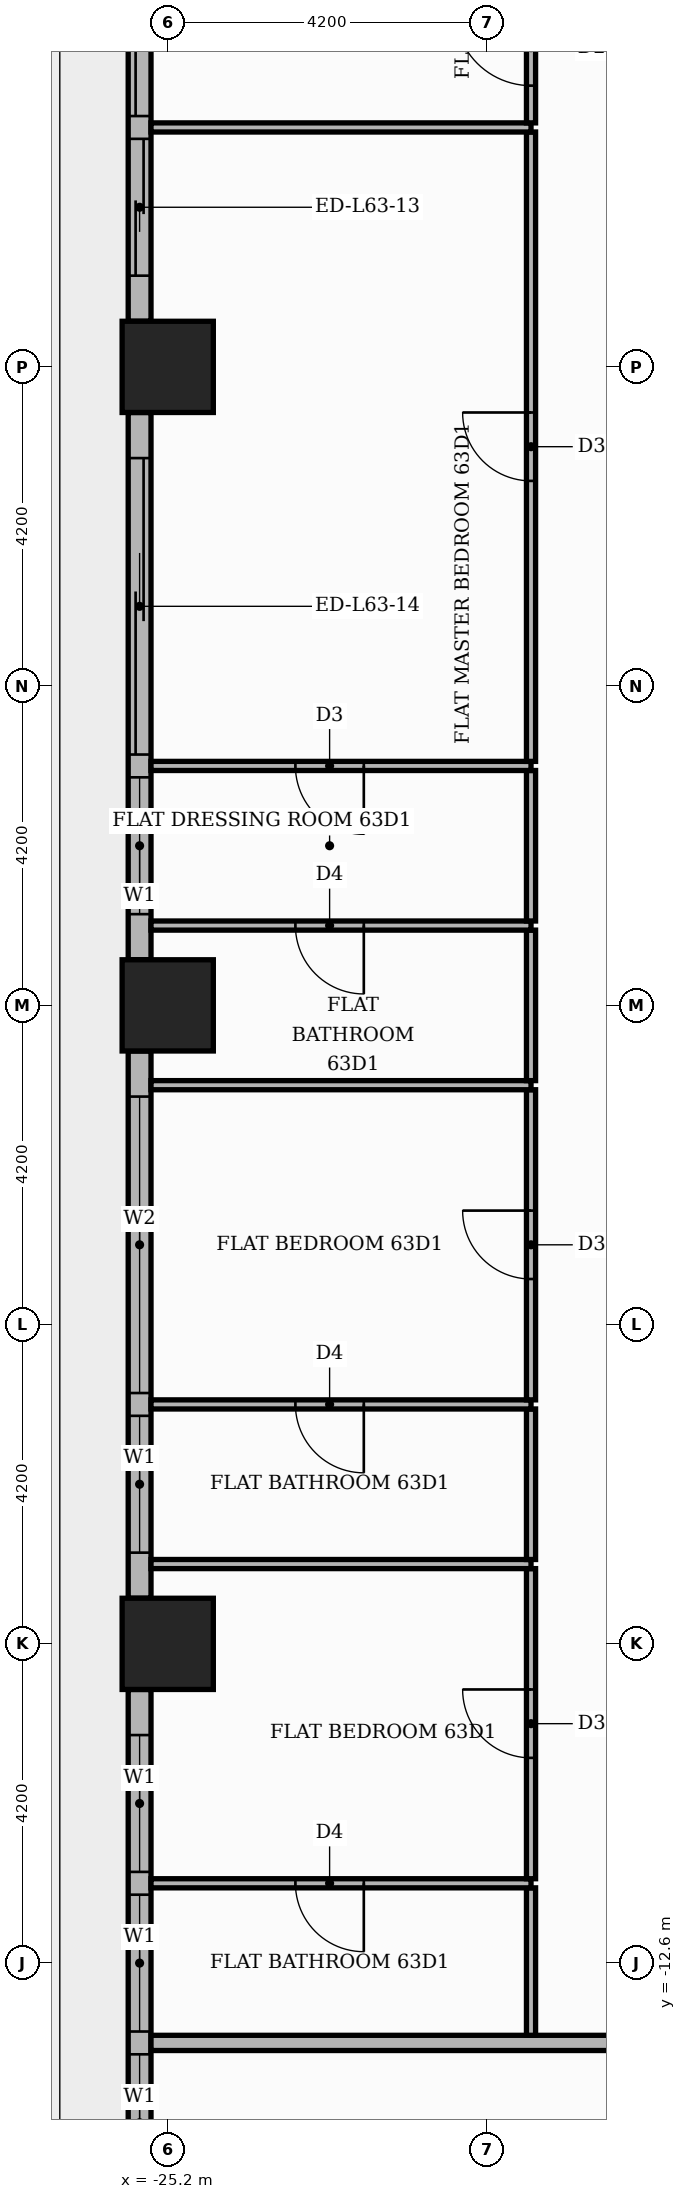
"""IFC4 building model, lengths in metres.
Left out: names, types, materials, properties, quantities, classifications, styles, units other than length and angle.
Written with IfcOpenShell. Run it as: python <this file> out.ifc"""

import sys

from ifc_helpers import new_model, si_unit, direction, frame, frame_2d, origin, origin_2d, place, context, subcontext, project, spatial, rectangle, extrude, element, fill, save


model = new_model("IFC4")
c1 = context("Model", 3, precision=1e-05, world=origin(), true_north=direction((0.0, 1.0)))
c2 = subcontext(c1, "Body", "Model", "MODEL_VIEW")
j1 = project(units=[si_unit("LENGTHUNIT", "METRE"), si_unit("PLANEANGLEUNIT", "RADIAN")], contexts=[c1])
p1 = place(None, origin())
s1 = spatial("IfcSite", under=j1, at=p1, CompositionType="ELEMENT")
p2 = place(p1, origin())
s2 = spatial("IfcBuilding", under=s1, at=p2, CompositionType="ELEMENT")
p3 = place(p2, frame((0.0, 0.0, 264.0)))
s3 = spatial("IfcBuildingStorey", under=s2, at=p3, CompositionType="ELEMENT", Elevation=264.0)
for number, where, z_axis, x_axis in (
    (1, (-25.2, 0.0, 0.0), (0.0, 0.0, 1.0), (1.0, 0.0, 0.0)),
    (2, (-25.2, -8.4, 0.0), (0.0, 0.0, 1.0), (1.0, 0.0, 0.0)),
    (3, (-25.2, 8.4, 0.0), (0.0, 0.0, 1.0), (1.0, 0.0, 0.0)),
):
    element("IfcColumn", number, at=place(p3, frame(where, z_axis=z_axis, x_axis=x_axis)), inside=s3, PredefinedType="COLUMN", context=c2, shape_type="SweptSolid", body=[
        extrude(rectangle(XDim=1.2, YDim=1.2, at=origin_2d()), origin(), (0.0, 0.0, 1.0), 3.9),
    ])
p4 = place(p3, frame((-25.57, 16.2, 0.0), z_axis=(0.0, 0.0, 1.0), x_axis=(0.0, -1.0, 0.0)))
e4 = element("IfcWall", 4, at=p4, inside=s3, PredefinedType="STANDARD", context=c2, shape_type="SweptSolid", body=[
    extrude(rectangle(XDim=7.2, YDim=0.3, at=frame_2d((3.6, 0.0))), origin(), (0.0, 0.0, 1.0), 3.48),
])
p5 = place(p4, frame((0.6, 0.0, 0.0)))
e5 = element("IfcOpeningElement", 5, at=p5, cuts=e4, PredefinedType="OPENING", context=c2, shape_type="SweptSolid", body=[
    extrude(rectangle(XDim=3.9, YDim=2.4, at=frame_2d((1.95, 1.2))), frame((0.0, 0.16, 0.0), z_axis=(0.0, -1.0, 0.0), x_axis=(1.0, 0.0, 0.0)), (0.0, 0.0, 1.0), 0.32),
])
p6 = place(p4, frame((4.8, 0.0, 0.0)))
e6 = element("IfcOpeningElement", 6, at=p6, cuts=e4, PredefinedType="OPENING", context=c2, shape_type="SweptSolid", body=[
    extrude(rectangle(XDim=1.8, YDim=2.4, at=frame_2d((0.9, 1.2))), frame((0.0, 0.16, 0.0), z_axis=(0.0, -1.0, 0.0), x_axis=(1.0, 0.0, 0.0)), (0.0, 0.0, 1.0), 0.32),
])
p7 = place(p3, frame((-25.57, 7.8, 0.0), z_axis=(0.0, 0.0, 1.0), x_axis=(0.0, -1.0, 0.0)))
e7 = element("IfcWall", 7, at=p7, inside=s3, PredefinedType="STANDARD", context=c2, shape_type="SweptSolid", body=[
    extrude(rectangle(XDim=7.2, YDim=0.3, at=frame_2d((3.6, 0.0))), origin(), (0.0, 0.0, 1.0), 3.48),
])
p8 = place(p7, frame((0.6, 0.0, 0.0)))
e8 = element("IfcOpeningElement", 8, at=p8, cuts=e7, PredefinedType="OPENING", context=c2, shape_type="SweptSolid", body=[
    extrude(rectangle(XDim=3.9, YDim=2.4, at=frame_2d((1.95, 1.2))), frame((0.0, 0.16, 0.0), z_axis=(0.0, -1.0, 0.0), x_axis=(1.0, 0.0, 0.0)), (0.0, 0.0, 1.0), 0.32),
])
p9 = place(p7, frame((4.8, 0.0, 0.9)))
e9 = element("IfcOpeningElement", 9, at=p9, cuts=e7, PredefinedType="OPENING", context=c2, shape_type="SweptSolid", body=[
    extrude(rectangle(XDim=1.8, YDim=2.1, at=frame_2d((0.9, 1.05))), frame((0.0, 0.16, 0.0), z_axis=(0.0, -1.0, 0.0), x_axis=(1.0, 0.0, 0.0)), (0.0, 0.0, 1.0), 0.32),
])
p10 = place(p3, frame((-25.57, -0.6, 0.0), z_axis=(0.0, 0.0, 1.0), x_axis=(0.0, -1.0, 0.0)))
e10 = element("IfcWall", 10, at=p10, inside=s3, PredefinedType="STANDARD", context=c2, shape_type="SweptSolid", body=[
    extrude(rectangle(XDim=7.2, YDim=0.3, at=frame_2d((3.6, 0.0))), origin(), (0.0, 0.0, 1.0), 3.48),
])
p11 = place(p10, frame((0.6, 0.0, 0.9)))
e11 = element("IfcOpeningElement", 11, at=p11, cuts=e10, PredefinedType="OPENING", context=c2, shape_type="SweptSolid", body=[
    extrude(rectangle(XDim=3.9, YDim=2.1, at=frame_2d((1.95, 1.05))), frame((0.0, 0.16, 0.0), z_axis=(0.0, -1.0, 0.0), x_axis=(1.0, 0.0, 0.0)), (0.0, 0.0, 1.0), 0.32),
])
p12 = place(p10, frame((4.8, 0.0, 0.9)))
e12 = element("IfcOpeningElement", 12, at=p12, cuts=e10, PredefinedType="OPENING", context=c2, shape_type="SweptSolid", body=[
    extrude(rectangle(XDim=1.8, YDim=2.1, at=frame_2d((0.9, 1.05))), frame((0.0, 0.16, 0.0), z_axis=(0.0, -1.0, 0.0), x_axis=(1.0, 0.0, 0.0)), (0.0, 0.0, 1.0), 0.32),
])
p13 = place(p3, frame((-25.57, -9.0, 0.0), z_axis=(0.0, 0.0, 1.0), x_axis=(0.0, -1.0, 0.0)))
e13 = element("IfcWall", 13, at=p13, inside=s3, PredefinedType="STANDARD", context=c2, shape_type="SweptSolid", body=[
    extrude(rectangle(XDim=7.2, YDim=0.3, at=frame_2d((3.6, 0.0))), origin(), (0.0, 0.0, 1.0), 3.48),
])
p14 = place(p13, frame((0.6, 0.0, 0.9)))
e14 = element("IfcOpeningElement", 14, at=p14, cuts=e13, PredefinedType="OPENING", context=c2, shape_type="SweptSolid", body=[
    extrude(rectangle(XDim=1.8, YDim=2.1, at=frame_2d((0.9, 1.05))), frame((0.0, 0.16, 0.0), z_axis=(0.0, -1.0, 0.0), x_axis=(1.0, 0.0, 0.0)), (0.0, 0.0, 1.0), 0.32),
])
p15 = place(p13, frame((2.7, 0.0, 0.9)))
e15 = element("IfcOpeningElement", 15, at=p15, cuts=e13, PredefinedType="OPENING", context=c2, shape_type="SweptSolid", body=[
    extrude(rectangle(XDim=1.8, YDim=2.1, at=frame_2d((0.9, 1.05))), frame((0.0, 0.16, 0.0), z_axis=(0.0, -1.0, 0.0), x_axis=(1.0, 0.0, 0.0)), (0.0, 0.0, 1.0), 0.32),
])
p16 = place(p13, frame((4.8, 0.0, 0.9)))
e16 = element("IfcOpeningElement", 16, at=p16, cuts=e13, PredefinedType="OPENING", context=c2, shape_type="SweptSolid", body=[
    extrude(rectangle(XDim=1.8, YDim=2.1, at=frame_2d((0.9, 1.05))), frame((0.0, 0.16, 0.0), z_axis=(0.0, -1.0, 0.0), x_axis=(1.0, 0.0, 0.0)), (0.0, 0.0, 1.0), 0.32),
])
p17 = place(p3, frame((-25.42, -13.65, 0.0), z_axis=(0.0, 0.0, 1.0), x_axis=(1.0, 0.0, 0.0)))
e17 = element("IfcWall", 17, at=p17, inside=s3, PredefinedType="PARTITIONING", context=c2, shape_type="SweptSolid", body=[
    extrude(rectangle(XDim=39.07, YDim=0.2, at=frame_2d((19.535, 0.0))), origin(), (0.0, 0.0, 1.0), 3.48),
])
p18 = place(p17, frame((14.37, 0.0, 0.0)))
e18 = element("IfcOpeningElement", 18, at=p18, cuts=e17, PredefinedType="OPENING", context=c2, shape_type="SweptSolid", body=[
    extrude(rectangle(XDim=1.1, YDim=2.4, at=frame_2d((0.55, 1.2))), frame((0.0, 0.11, 0.0), z_axis=(0.0, -1.0, 0.0), x_axis=(1.0, 0.0, 0.0)), (0.0, 0.0, 1.0), 0.22),
])
p19 = place(p3, frame((-20.42, -13.55, 0.0), z_axis=(0.0, 0.0, 1.0), x_axis=(0.0, 1.0, 0.0)))
e19 = element("IfcWall", 19, at=p19, inside=s3, PredefinedType="PARTITIONING", context=c2, shape_type="SweptSolid", body=[
    extrude(rectangle(XDim=1.94, YDim=0.12, at=frame_2d((0.97, 0.0))), origin(), (0.0, 0.0, 1.0), 3.48),
])
p20 = place(p3, frame((-25.42, -11.55, 0.0), z_axis=(0.0, 0.0, 1.0), x_axis=(1.0, 0.0, 0.0)))
e20 = element("IfcWall", 20, at=p20, inside=s3, PredefinedType="PARTITIONING", context=c2, shape_type="SweptSolid", body=[
    extrude(rectangle(XDim=5.0, YDim=0.12, at=frame_2d((2.5, 0.0))), origin(), (0.0, 0.0, 1.0), 3.48),
])
p21 = place(p20, frame((1.9, 0.0, 0.0)))
e21 = element("IfcOpeningElement", 21, at=p21, cuts=e20, PredefinedType="OPENING", context=c2, shape_type="SweptSolid", body=[
    extrude(rectangle(XDim=0.9, YDim=2.1, at=frame_2d((0.45, 1.05))), frame((0.0, 0.07, 0.0), z_axis=(0.0, -1.0, 0.0), x_axis=(1.0, 0.0, 0.0)), (0.0, 0.0, 1.0), 0.14),
])
p22 = place(p3, frame((-20.42, -11.49, 0.0), z_axis=(0.0, 0.0, 1.0), x_axis=(0.0, 1.0, 0.0)))
e22 = element("IfcWall", 22, at=p22, inside=s3, PredefinedType="PARTITIONING", context=c2, shape_type="SweptSolid", body=[
    extrude(rectangle(XDim=4.08, YDim=0.12, at=frame_2d((2.04, 0.0))), origin(), (0.0, 0.0, 1.0), 3.48),
])
p23 = place(p22, frame((1.59, 0.0, 0.0)))
e23 = element("IfcOpeningElement", 23, at=p23, cuts=e22, PredefinedType="OPENING", context=c2, shape_type="SweptSolid", body=[
    extrude(rectangle(XDim=0.9, YDim=2.1, at=frame_2d((0.45, 1.05))), frame((0.0, 0.07, 0.0), z_axis=(0.0, -1.0, 0.0), x_axis=(1.0, 0.0, 0.0)), (0.0, 0.0, 1.0), 0.14),
])
p24 = place(p3, frame((-25.42, -7.35, 0.0), z_axis=(0.0, 0.0, 1.0), x_axis=(1.0, 0.0, 0.0)))
e24 = element("IfcWall", 24, at=p24, inside=s3, PredefinedType="PARTITIONING", context=c2, shape_type="SweptSolid", body=[
    extrude(rectangle(XDim=5.0, YDim=0.12, at=frame_2d((2.5, 0.0))), origin(), (0.0, 0.0, 1.0), 3.48),
])
p25 = place(p3, frame((-20.42, -7.29, 0.0), z_axis=(0.0, 0.0, 1.0), x_axis=(0.0, 1.0, 0.0)))
e25 = element("IfcWall", 25, at=p25, inside=s3, PredefinedType="PARTITIONING", context=c2, shape_type="SweptSolid", body=[
    extrude(rectangle(XDim=1.98, YDim=0.12, at=frame_2d((0.99, 0.0))), origin(), (0.0, 0.0, 1.0), 3.48),
])
p26 = place(p3, frame((-25.42, -5.25, 0.0), z_axis=(0.0, 0.0, 1.0), x_axis=(1.0, 0.0, 0.0)))
e26 = element("IfcWall", 26, at=p26, inside=s3, PredefinedType="PARTITIONING", context=c2, shape_type="SweptSolid", body=[
    extrude(rectangle(XDim=5.0, YDim=0.12, at=frame_2d((2.5, 0.0))), origin(), (0.0, 0.0, 1.0), 3.48),
])
p27 = place(p26, frame((1.9, 0.0, 0.0)))
e27 = element("IfcOpeningElement", 27, at=p27, cuts=e26, PredefinedType="OPENING", context=c2, shape_type="SweptSolid", body=[
    extrude(rectangle(XDim=0.9, YDim=2.1, at=frame_2d((0.45, 1.05))), frame((0.0, 0.07, 0.0), z_axis=(0.0, -1.0, 0.0), x_axis=(1.0, 0.0, 0.0)), (0.0, 0.0, 1.0), 0.14),
])
p28 = place(p3, frame((-20.42, -5.19, 0.0), z_axis=(0.0, 0.0, 1.0), x_axis=(0.0, 1.0, 0.0)))
e28 = element("IfcWall", 28, at=p28, inside=s3, PredefinedType="PARTITIONING", context=c2, shape_type="SweptSolid", body=[
    extrude(rectangle(XDim=4.08, YDim=0.12, at=frame_2d((2.04, 0.0))), origin(), (0.0, 0.0, 1.0), 3.48),
])
p29 = place(p28, frame((1.59, 0.0, 0.0)))
e29 = element("IfcOpeningElement", 29, at=p29, cuts=e28, PredefinedType="OPENING", context=c2, shape_type="SweptSolid", body=[
    extrude(rectangle(XDim=0.9, YDim=2.1, at=frame_2d((0.45, 1.05))), frame((0.0, 0.07, 0.0), z_axis=(0.0, -1.0, 0.0), x_axis=(1.0, 0.0, 0.0)), (0.0, 0.0, 1.0), 0.14),
])
p30 = place(p3, frame((-25.42, -1.05, 0.0), z_axis=(0.0, 0.0, 1.0), x_axis=(1.0, 0.0, 0.0)))
e30 = element("IfcWall", 30, at=p30, inside=s3, PredefinedType="PARTITIONING", context=c2, shape_type="SweptSolid", body=[
    extrude(rectangle(XDim=5.0, YDim=0.12, at=frame_2d((2.5, 0.0))), origin(), (0.0, 0.0, 1.0), 3.48),
])
p31 = place(p3, frame((-20.42, -0.99, 0.0), z_axis=(0.0, 0.0, 1.0), x_axis=(0.0, 1.0, 0.0)))
e31 = element("IfcWall", 31, at=p31, inside=s3, PredefinedType="PARTITIONING", context=c2, shape_type="SweptSolid", body=[
    extrude(rectangle(XDim=1.98, YDim=0.12, at=frame_2d((0.99, 0.0))), origin(), (0.0, 0.0, 1.0), 3.48),
])
p32 = place(p3, frame((-25.42, 1.05, 0.0), z_axis=(0.0, 0.0, 1.0), x_axis=(1.0, 0.0, 0.0)))
e32 = element("IfcWall", 32, at=p32, inside=s3, PredefinedType="PARTITIONING", context=c2, shape_type="SweptSolid", body=[
    extrude(rectangle(XDim=5.0, YDim=0.12, at=frame_2d((2.5, 0.0))), origin(), (0.0, 0.0, 1.0), 3.48),
])
p33 = place(p32, frame((1.9, 0.0, 0.0)))
e33 = element("IfcOpeningElement", 33, at=p33, cuts=e32, PredefinedType="OPENING", context=c2, shape_type="SweptSolid", body=[
    extrude(rectangle(XDim=0.9, YDim=2.1, at=frame_2d((0.45, 1.05))), frame((0.0, 0.07, 0.0), z_axis=(0.0, -1.0, 0.0), x_axis=(1.0, 0.0, 0.0)), (0.0, 0.0, 1.0), 0.14),
])
p34 = place(p3, frame((-20.42, 1.11, 0.0), z_axis=(0.0, 0.0, 1.0), x_axis=(0.0, 1.0, 0.0)))
e34 = element("IfcWall", 34, at=p34, inside=s3, PredefinedType="PARTITIONING", context=c2, shape_type="SweptSolid", body=[
    extrude(rectangle(XDim=1.98, YDim=0.12, at=frame_2d((0.99, 0.0))), origin(), (0.0, 0.0, 1.0), 3.48),
])
p35 = place(p3, frame((-25.42, 3.15, 0.0), z_axis=(0.0, 0.0, 1.0), x_axis=(1.0, 0.0, 0.0)))
e35 = element("IfcWall", 35, at=p35, inside=s3, PredefinedType="PARTITIONING", context=c2, shape_type="SweptSolid", body=[
    extrude(rectangle(XDim=5.0, YDim=0.12, at=frame_2d((2.5, 0.0))), origin(), (0.0, 0.0, 1.0), 3.48),
])
p36 = place(p35, frame((1.9, 0.0, 0.0)))
e36 = element("IfcOpeningElement", 36, at=p36, cuts=e35, PredefinedType="OPENING", context=c2, shape_type="SweptSolid", body=[
    extrude(rectangle(XDim=0.9, YDim=2.1, at=frame_2d((0.45, 1.05))), frame((0.0, 0.07, 0.0), z_axis=(0.0, -1.0, 0.0), x_axis=(1.0, 0.0, 0.0)), (0.0, 0.0, 1.0), 0.14),
])
p37 = place(p3, frame((-20.42, 3.21, 0.0), z_axis=(0.0, 0.0, 1.0), x_axis=(0.0, 1.0, 0.0)))
e37 = element("IfcWall", 37, at=p37, inside=s3, PredefinedType="PARTITIONING", context=c2, shape_type="SweptSolid", body=[
    extrude(rectangle(XDim=8.28, YDim=0.12, at=frame_2d((4.14, 0.0))), origin(), (0.0, 0.0, 1.0), 3.48),
])
p38 = place(p37, frame((3.69, 0.0, 0.0)))
e38 = element("IfcOpeningElement", 38, at=p38, cuts=e37, PredefinedType="OPENING", context=c2, shape_type="SweptSolid", body=[
    extrude(rectangle(XDim=0.9, YDim=2.1, at=frame_2d((0.45, 1.05))), frame((0.0, 0.07, 0.0), z_axis=(0.0, -1.0, 0.0), x_axis=(1.0, 0.0, 0.0)), (0.0, 0.0, 1.0), 0.14),
])
p39 = place(p3, frame((-25.42, 11.55, 0.0), z_axis=(0.0, 0.0, 1.0), x_axis=(1.0, 0.0, 0.0)))
e39 = element("IfcWall", 39, at=p39, inside=s3, PredefinedType="PARTITIONING", context=c2, shape_type="SweptSolid", body=[
    extrude(rectangle(XDim=5.0, YDim=0.12, at=frame_2d((2.5, 0.0))), origin(), (0.0, 0.0, 1.0), 3.48),
])
p40 = place(p3, frame((-20.42, 11.61, 0.0), z_axis=(0.0, 0.0, 1.0), x_axis=(0.0, 1.0, 0.0)))
e40 = element("IfcWall", 40, at=p40, inside=s3, PredefinedType="PARTITIONING", context=c2, shape_type="SweptSolid", body=[
    extrude(rectangle(XDim=1.98, YDim=0.12, at=frame_2d((0.99, 0.0))), origin(), (0.0, 0.0, 1.0), 3.48),
])
p41 = place(p40, frame((0.49, 0.0, 0.0)))
e41 = element("IfcOpeningElement", 41, at=p41, cuts=e40, PredefinedType="OPENING", context=c2, shape_type="SweptSolid", body=[
    extrude(rectangle(XDim=1.0, YDim=2.1, at=frame_2d((0.5, 1.05))), frame((0.0, 0.07, 0.0), z_axis=(0.0, -1.0, 0.0), x_axis=(1.0, 0.0, 0.0)), (0.0, 0.0, 1.0), 0.14),
])
p42 = place(p5, origin())
e42 = element("IfcDoor", 42, at=p42, inside=s3, OperationType="SLIDING_TO_LEFT", PredefinedType="DOOR", context=c2, shape_type="SweptSolid", body=[
    extrude(rectangle(XDim=3.9, YDim=2.4, at=frame_2d((1.95, 1.2))), frame((0.0, 0.025, 0.0), z_axis=(0.0, -1.0, 0.0), x_axis=(1.0, 0.0, 0.0)), (0.0, 0.0, 1.0), 0.05),
])
fill(e5, e42)
p43 = place(p6, origin())
e43 = element("IfcDoor", 43, at=p43, inside=s3, OperationType="SLIDING_TO_RIGHT", PredefinedType="DOOR", context=c2, shape_type="SweptSolid", body=[
    extrude(rectangle(XDim=1.8, YDim=2.4, at=frame_2d((0.9, 1.2))), frame((0.0, 0.025, 0.0), z_axis=(0.0, -1.0, 0.0), x_axis=(1.0, 0.0, 0.0)), (0.0, 0.0, 1.0), 0.05),
])
fill(e6, e43)
p44 = place(p8, origin())
e44 = element("IfcDoor", 44, at=p44, inside=s3, OperationType="SLIDING_TO_LEFT", PredefinedType="DOOR", context=c2, shape_type="SweptSolid", body=[
    extrude(rectangle(XDim=3.9, YDim=2.4, at=frame_2d((1.95, 1.2))), frame((0.0, 0.025, 0.0), z_axis=(0.0, -1.0, 0.0), x_axis=(1.0, 0.0, 0.0)), (0.0, 0.0, 1.0), 0.05),
])
fill(e8, e44)
p45 = place(p9, origin())
e45 = element("IfcWindow", 45, at=p45, inside=s3, PartitioningType="SINGLE_PANEL", PredefinedType="WINDOW", context=c2, shape_type="SweptSolid", body=[
    extrude(rectangle(XDim=1.8, YDim=2.1, at=frame_2d((0.9, 1.05))), frame((0.0, 0.03, 0.0), z_axis=(0.0, -1.0, 0.0), x_axis=(1.0, 0.0, 0.0)), (0.0, 0.0, 1.0), 0.06),
])
fill(e9, e45)
p46 = place(p11, origin())
e46 = element("IfcWindow", 46, at=p46, inside=s3, PartitioningType="SINGLE_PANEL", PredefinedType="WINDOW", context=c2, shape_type="SweptSolid", body=[
    extrude(rectangle(XDim=3.9, YDim=2.1, at=frame_2d((1.95, 1.05))), frame((0.0, 0.03, 0.0), z_axis=(0.0, -1.0, 0.0), x_axis=(1.0, 0.0, 0.0)), (0.0, 0.0, 1.0), 0.06),
])
fill(e11, e46)
p47 = place(p12, origin())
e47 = element("IfcWindow", 47, at=p47, inside=s3, PartitioningType="SINGLE_PANEL", PredefinedType="WINDOW", context=c2, shape_type="SweptSolid", body=[
    extrude(rectangle(XDim=1.8, YDim=2.1, at=frame_2d((0.9, 1.05))), frame((0.0, 0.03, 0.0), z_axis=(0.0, -1.0, 0.0), x_axis=(1.0, 0.0, 0.0)), (0.0, 0.0, 1.0), 0.06),
])
fill(e12, e47)
p48 = place(p14, origin())
e48 = element("IfcWindow", 48, at=p48, inside=s3, PartitioningType="SINGLE_PANEL", PredefinedType="WINDOW", context=c2, shape_type="SweptSolid", body=[
    extrude(rectangle(XDim=1.8, YDim=2.1, at=frame_2d((0.9, 1.05))), frame((0.0, 0.03, 0.0), z_axis=(0.0, -1.0, 0.0), x_axis=(1.0, 0.0, 0.0)), (0.0, 0.0, 1.0), 0.06),
])
fill(e14, e48)
p49 = place(p15, origin())
e49 = element("IfcWindow", 49, at=p49, inside=s3, PartitioningType="SINGLE_PANEL", PredefinedType="WINDOW", context=c2, shape_type="SweptSolid", body=[
    extrude(rectangle(XDim=1.8, YDim=2.1, at=frame_2d((0.9, 1.05))), frame((0.0, 0.03, 0.0), z_axis=(0.0, -1.0, 0.0), x_axis=(1.0, 0.0, 0.0)), (0.0, 0.0, 1.0), 0.06),
])
fill(e15, e49)
p50 = place(p16, origin())
e50 = element("IfcWindow", 50, at=p50, inside=s3, PartitioningType="SINGLE_PANEL", PredefinedType="WINDOW", context=c2, shape_type="SweptSolid", body=[
    extrude(rectangle(XDim=1.8, YDim=2.1, at=frame_2d((0.9, 1.05))), frame((0.0, 0.03, 0.0), z_axis=(0.0, -1.0, 0.0), x_axis=(1.0, 0.0, 0.0)), (0.0, 0.0, 1.0), 0.06),
])
fill(e16, e50)
p51 = place(p41, origin())
e51 = element("IfcDoor", 51, at=p51, inside=s3, OperationType="SINGLE_SWING_RIGHT", PredefinedType="DOOR", context=c2, shape_type="SweptSolid", body=[
    extrude(rectangle(XDim=1.0, YDim=2.1, at=frame_2d((0.5, 1.05))), frame((0.0, 0.025, 0.0), z_axis=(0.0, -1.0, 0.0), x_axis=(1.0, 0.0, 0.0)), (0.0, 0.0, 1.0), 0.05),
])
fill(e41, e51)
p52 = place(p38, origin())
e52 = element("IfcDoor", 52, at=p52, inside=s3, OperationType="SINGLE_SWING_RIGHT", PredefinedType="DOOR", context=c2, shape_type="SweptSolid", body=[
    extrude(rectangle(XDim=0.9, YDim=2.1, at=frame_2d((0.45, 1.05))), frame((0.0, 0.025, 0.0), z_axis=(0.0, -1.0, 0.0), x_axis=(1.0, 0.0, 0.0)), (0.0, 0.0, 1.0), 0.05),
])
fill(e38, e52)
p53 = place(p36, frame((0.9, 0.0, 0.0), z_axis=(0.0, 0.0, 1.0), x_axis=(-1.0, 0.0, 0.0)))
e53 = element("IfcDoor", 53, at=p53, inside=s3, OperationType="SINGLE_SWING_RIGHT", PredefinedType="DOOR", context=c2, shape_type="SweptSolid", body=[
    extrude(rectangle(XDim=0.9, YDim=2.1, at=frame_2d((0.45, 1.05))), frame((0.0, 0.025, 0.0), z_axis=(0.0, -1.0, 0.0), x_axis=(1.0, 0.0, 0.0)), (0.0, 0.0, 1.0), 0.05),
])
fill(e36, e53)
p54 = place(p33, frame((0.9, 0.0, 0.0), z_axis=(0.0, 0.0, 1.0), x_axis=(-1.0, 0.0, 0.0)))
e54 = element("IfcDoor", 54, at=p54, inside=s3, OperationType="SINGLE_SWING_RIGHT", PredefinedType="DOOR", context=c2, shape_type="SweptSolid", body=[
    extrude(rectangle(XDim=0.9, YDim=2.1, at=frame_2d((0.45, 1.05))), frame((0.0, 0.025, 0.0), z_axis=(0.0, -1.0, 0.0), x_axis=(1.0, 0.0, 0.0)), (0.0, 0.0, 1.0), 0.05),
])
fill(e33, e54)
p55 = place(p29, origin())
e55 = element("IfcDoor", 55, at=p55, inside=s3, OperationType="SINGLE_SWING_RIGHT", PredefinedType="DOOR", context=c2, shape_type="SweptSolid", body=[
    extrude(rectangle(XDim=0.9, YDim=2.1, at=frame_2d((0.45, 1.05))), frame((0.0, 0.025, 0.0), z_axis=(0.0, -1.0, 0.0), x_axis=(1.0, 0.0, 0.0)), (0.0, 0.0, 1.0), 0.05),
])
fill(e29, e55)
p56 = place(p27, frame((0.9, 0.0, 0.0), z_axis=(0.0, 0.0, 1.0), x_axis=(-1.0, 0.0, 0.0)))
e56 = element("IfcDoor", 56, at=p56, inside=s3, OperationType="SINGLE_SWING_RIGHT", PredefinedType="DOOR", context=c2, shape_type="SweptSolid", body=[
    extrude(rectangle(XDim=0.9, YDim=2.1, at=frame_2d((0.45, 1.05))), frame((0.0, 0.025, 0.0), z_axis=(0.0, -1.0, 0.0), x_axis=(1.0, 0.0, 0.0)), (0.0, 0.0, 1.0), 0.05),
])
fill(e27, e56)
p57 = place(p23, origin())
e57 = element("IfcDoor", 57, at=p57, inside=s3, OperationType="SINGLE_SWING_RIGHT", PredefinedType="DOOR", context=c2, shape_type="SweptSolid", body=[
    extrude(rectangle(XDim=0.9, YDim=2.1, at=frame_2d((0.45, 1.05))), frame((0.0, 0.025, 0.0), z_axis=(0.0, -1.0, 0.0), x_axis=(1.0, 0.0, 0.0)), (0.0, 0.0, 1.0), 0.05),
])
fill(e23, e57)
p58 = place(p21, frame((0.9, 0.0, 0.0), z_axis=(0.0, 0.0, 1.0), x_axis=(-1.0, 0.0, 0.0)))
e58 = element("IfcDoor", 58, at=p58, inside=s3, OperationType="SINGLE_SWING_RIGHT", PredefinedType="DOOR", context=c2, shape_type="SweptSolid", body=[
    extrude(rectangle(XDim=0.9, YDim=2.1, at=frame_2d((0.45, 1.05))), frame((0.0, 0.025, 0.0), z_axis=(0.0, -1.0, 0.0), x_axis=(1.0, 0.0, 0.0)), (0.0, 0.0, 1.0), 0.05),
])
fill(e21, e58)
save(model, sys.argv[1])
